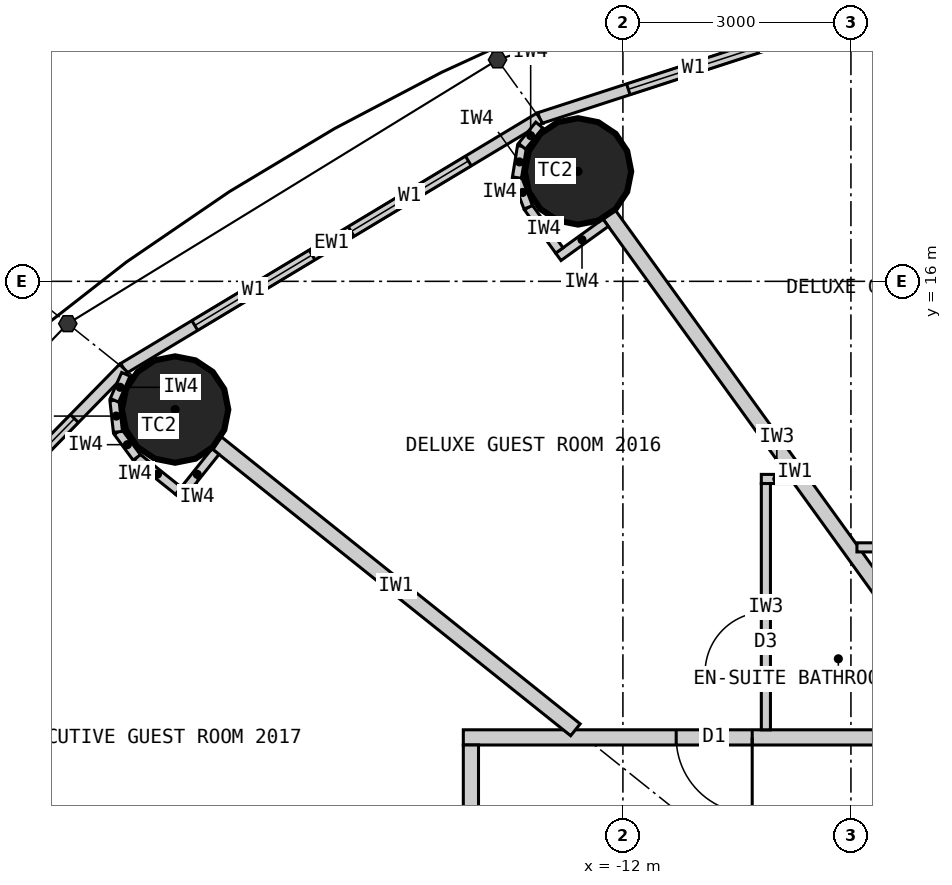
"""IFC4 building model, lengths in metres.
Left out: names, types, materials, properties, quantities, classifications, styles, units other than length and angle.
Written with IfcOpenShell. Run it as: python <this file> out.ifc"""

import sys

from ifc_helpers import new_model, si_unit, direction, frame, frame_2d, origin, origin_2d, place, context, subcontext, project, spatial, rectangle, circle, extrude, element, fill, save


model = new_model("IFC4")
c1 = context("Model", 3, precision=1e-05, world=origin(), true_north=direction((0.0, 1.0)))
c2 = subcontext(c1, "Body", "Model", "MODEL_VIEW")
j1 = project(units=[si_unit("LENGTHUNIT", "METRE"), si_unit("PLANEANGLEUNIT", "RADIAN")], contexts=[c1])
p1 = place(None, origin())
s1 = spatial("IfcSite", under=j1, at=p1, CompositionType="ELEMENT")
p2 = place(p1, origin())
s2 = spatial("IfcBuilding", under=s1, at=p2, CompositionType="ELEMENT")
p3 = place(p2, frame((0.0, 0.0, 80.4)))
s3 = spatial("IfcBuildingStorey", under=s2, at=p3, CompositionType="ELEMENT", Elevation=80.4)
for number, where, z_axis, x_axis in (
    (1, (-12.591, 17.447, 0.0), (0.0, 0.0, 1.0), (1.0, 0.0, 0.0)),
    (2, (-17.892, 14.313, 0.0), (0.0, 0.0, 1.0), (1.0, 0.0, 0.0)),
):
    element("IfcColumn", number, at=place(p3, frame(where, z_axis=z_axis, x_axis=x_axis)), inside=s3, PredefinedType="COLUMN", context=c2, shape_type="SweptSolid", body=[
        extrude(circle(Radius=0.7, at=origin_2d()), origin(), (0.0, 0.0, 1.0), 3.3),
    ])
p4 = place(p3, frame((-6.766, 20.202, 0.0), z_axis=(0.0, 0.0, 1.0), x_axis=(-0.951137534625, -0.308767534285, 0.0)))
e3 = element("IfcWall", 3, at=p4, inside=s3, PredefinedType="ELEMENTEDWALL", context=c2, shape_type="SweptSolid", body=[
    extrude(rectangle(XDim=6.655, YDim=0.15, at=frame_2d((3.328, 0.0))), origin(), (0.0, 0.0, 1.0), 3.12),
])
p5 = place(p4, frame((1.228, 0.0, 0.9)))
e4 = element("IfcOpeningElement", 4, at=p5, cuts=e3, PredefinedType="OPENING", context=c2, shape_type="SweptSolid", body=[
    extrude(rectangle(XDim=1.8, YDim=1.9, at=frame_2d((0.9, 0.95))), frame((0.0, 0.085, 0.0), z_axis=(0.0, -1.0, 0.0), x_axis=(1.0, 0.0, 0.0)), (0.0, 0.0, 1.0), 0.17),
])
p6 = place(p4, frame((3.628, 0.0, 0.9)))
e5 = element("IfcOpeningElement", 5, at=p6, cuts=e3, PredefinedType="OPENING", context=c2, shape_type="SweptSolid", body=[
    extrude(rectangle(XDim=1.8, YDim=1.9, at=frame_2d((0.9, 0.95))), frame((0.0, 0.085, 0.0), z_axis=(0.0, -1.0, 0.0), x_axis=(1.0, 0.0, 0.0)), (0.0, 0.0, 1.0), 0.17),
])
p7 = place(p3, frame((-13.096, 18.147, 0.0), z_axis=(0.0, 0.0, 1.0), x_axis=(-0.856983180864, -0.515344377787, 0.0)))
e6 = element("IfcWall", 6, at=p7, inside=s3, PredefinedType="ELEMENTEDWALL", context=c2, shape_type="SweptSolid", body=[
    extrude(rectangle(XDim=6.386, YDim=0.15, at=frame_2d((3.193, 0.0))), origin(), (0.0, 0.0, 1.0), 3.12),
])
p8 = place(p7, frame((1.093, 0.0, 0.9)))
e7 = element("IfcOpeningElement", 7, at=p8, cuts=e6, PredefinedType="OPENING", context=c2, shape_type="SweptSolid", body=[
    extrude(rectangle(XDim=1.8, YDim=1.9, at=frame_2d((0.9, 0.95))), frame((0.0, 0.085, 0.0), z_axis=(0.0, -1.0, 0.0), x_axis=(1.0, 0.0, 0.0)), (0.0, 0.0, 1.0), 0.17),
])
p9 = place(p7, frame((3.493, 0.0, 0.9)))
e8 = element("IfcOpeningElement", 8, at=p9, cuts=e6, PredefinedType="OPENING", context=c2, shape_type="SweptSolid", body=[
    extrude(rectangle(XDim=1.8, YDim=1.9, at=frame_2d((0.9, 0.95))), frame((0.0, 0.085, 0.0), z_axis=(0.0, -1.0, 0.0), x_axis=(1.0, 0.0, 0.0)), (0.0, 0.0, 1.0), 0.17),
])
p10 = place(p3, frame((-18.57, 14.856, 0.0), z_axis=(0.0, 0.0, 1.0), x_axis=(-0.699602905915, -0.714531856557, 0.0)))
e9 = element("IfcWall", 9, at=p10, inside=s3, PredefinedType="ELEMENTEDWALL", context=c2, shape_type="SweptSolid", body=[
    extrude(rectangle(XDim=6.051, YDim=0.15, at=frame_2d((3.025, 0.0))), origin(), (0.0, 0.0, 1.0), 3.12),
])
p11 = place(p10, frame((0.926, 0.0, 0.9)))
e10 = element("IfcOpeningElement", 10, at=p11, cuts=e9, PredefinedType="OPENING", context=c2, shape_type="SweptSolid", body=[
    extrude(rectangle(XDim=1.8, YDim=1.9, at=frame_2d((0.9, 0.95))), frame((0.0, 0.085, 0.0), z_axis=(0.0, -1.0, 0.0), x_axis=(1.0, 0.0, 0.0)), (0.0, 0.0, 1.0), 0.17),
])
p12 = place(p10, frame((3.325, 0.0, 0.9)))
e11 = element("IfcOpeningElement", 11, at=p12, cuts=e9, PredefinedType="OPENING", context=c2, shape_type="SweptSolid", body=[
    extrude(rectangle(XDim=1.8, YDim=1.9, at=frame_2d((0.9, 0.95))), frame((0.0, 0.085, 0.0), z_axis=(0.0, -1.0, 0.0), x_axis=(1.0, 0.0, 0.0)), (0.0, 0.0, 1.0), 0.17),
])
p13 = place(p3, frame((-14.1, 10.0, 0.0), z_axis=(0.0, 0.0, 1.0), x_axis=(1.0, 0.0, 0.0)))
e12 = element("IfcWall", 12, at=p13, inside=s3, PredefinedType="PARTITIONING", context=c2, shape_type="SweptSolid", body=[
    extrude(rectangle(XDim=28.2, YDim=0.2, at=frame_2d((14.1, 0.0))), origin(), (0.0, 0.0, 1.0), 3.12),
])
p14 = place(p13, frame((23.865, 0.0, 0.0)))
e13 = element("IfcOpeningElement", 13, at=p14, cuts=e12, PredefinedType="OPENING", context=c2, shape_type="SweptSolid", body=[
    extrude(rectangle(XDim=1.0, YDim=2.2, at=frame_2d((0.5, 1.1))), frame((0.0, 0.11, 0.0), z_axis=(0.0, -1.0, 0.0), x_axis=(1.0, 0.0, 0.0)), (0.0, 0.0, 1.0), 0.22),
])
p15 = place(p13, frame((18.529, 0.0, 0.0)))
e14 = element("IfcOpeningElement", 14, at=p15, cuts=e12, PredefinedType="OPENING", context=c2, shape_type="SweptSolid", body=[
    extrude(rectangle(XDim=1.0, YDim=2.2, at=frame_2d((0.5, 1.1))), frame((0.0, 0.11, 0.0), z_axis=(0.0, -1.0, 0.0), x_axis=(1.0, 0.0, 0.0)), (0.0, 0.0, 1.0), 0.22),
])
p16 = place(p13, frame((14.623, 0.0, 0.0)))
e15 = element("IfcOpeningElement", 15, at=p16, cuts=e12, PredefinedType="OPENING", context=c2, shape_type="SweptSolid", body=[
    extrude(rectangle(XDim=1.0, YDim=2.2, at=frame_2d((0.5, 1.1))), frame((0.0, 0.11, 0.0), z_axis=(0.0, -1.0, 0.0), x_axis=(1.0, 0.0, 0.0)), (0.0, 0.0, 1.0), 0.22),
])
p17 = place(p13, frame((11.24, 0.0, 0.0)))
e16 = element("IfcOpeningElement", 16, at=p17, cuts=e12, PredefinedType="OPENING", context=c2, shape_type="SweptSolid", body=[
    extrude(rectangle(XDim=1.0, YDim=2.2, at=frame_2d((0.5, 1.1))), frame((0.0, 0.11, 0.0), z_axis=(0.0, -1.0, 0.0), x_axis=(1.0, 0.0, 0.0)), (0.0, 0.0, 1.0), 0.22),
])
p18 = place(p13, frame((8.671, 0.0, 0.0)))
e17 = element("IfcOpeningElement", 17, at=p18, cuts=e12, PredefinedType="OPENING", context=c2, shape_type="SweptSolid", body=[
    extrude(rectangle(XDim=1.0, YDim=2.2, at=frame_2d((0.5, 1.1))), frame((0.0, 0.11, 0.0), z_axis=(0.0, -1.0, 0.0), x_axis=(1.0, 0.0, 0.0)), (0.0, 0.0, 1.0), 0.22),
])
p19 = place(p13, frame((2.801, 0.0, 0.0)))
e18 = element("IfcOpeningElement", 18, at=p19, cuts=e12, PredefinedType="OPENING", context=c2, shape_type="SweptSolid", body=[
    extrude(rectangle(XDim=1.0, YDim=2.2, at=frame_2d((0.5, 1.1))), frame((0.0, 0.11, 0.0), z_axis=(0.0, -1.0, 0.0), x_axis=(1.0, 0.0, 0.0)), (0.0, 0.0, 1.0), 0.22),
])
p20 = place(p3, frame((-14.0, 9.9, 0.0), z_axis=(0.0, 0.0, 1.0), x_axis=(0.0, -1.0, 0.0)))
e19 = element("IfcWall", 19, at=p20, inside=s3, PredefinedType="PARTITIONING", context=c2, shape_type="SweptSolid", body=[
    extrude(rectangle(XDim=19.8, YDim=0.2, at=frame_2d((9.9, 0.0))), origin(), (0.0, 0.0, 1.0), 3.12),
])
p21 = place(p20, frame((7.097, 0.0, 0.0)))
e20 = element("IfcOpeningElement", 20, at=p21, cuts=e19, PredefinedType="OPENING", context=c2, shape_type="SweptSolid", body=[
    extrude(rectangle(XDim=1.0, YDim=2.2, at=frame_2d((0.5, 1.1))), frame((0.0, 0.11, 0.0), z_axis=(0.0, -1.0, 0.0), x_axis=(1.0, 0.0, 0.0)), (0.0, 0.0, 1.0), 0.22),
])
p22 = place(p20, frame((10.778, 0.0, 0.0)))
e21 = element("IfcOpeningElement", 21, at=p22, cuts=e19, PredefinedType="OPENING", context=c2, shape_type="SweptSolid", body=[
    extrude(rectangle(XDim=1.0, YDim=2.2, at=frame_2d((0.5, 1.1))), frame((0.0, 0.11, 0.0), z_axis=(0.0, -1.0, 0.0), x_axis=(1.0, 0.0, 0.0)), (0.0, 0.0, 1.0), 0.22),
])
p23 = place(p20, frame((13.552, 0.0, 0.0)))
e22 = element("IfcOpeningElement", 22, at=p23, cuts=e19, PredefinedType="OPENING", context=c2, shape_type="SweptSolid", body=[
    extrude(rectangle(XDim=1.0, YDim=2.2, at=frame_2d((0.5, 1.1))), frame((0.0, 0.11, 0.0), z_axis=(0.0, -1.0, 0.0), x_axis=(1.0, 0.0, 0.0)), (0.0, 0.0, 1.0), 0.22),
])
p24 = place(p20, frame((18.698, 0.0, 0.0)))
e23 = element("IfcOpeningElement", 23, at=p24, cuts=e19, PredefinedType="OPENING", context=c2, shape_type="SweptSolid", body=[
    extrude(rectangle(XDim=1.0, YDim=2.2, at=frame_2d((0.5, 1.1))), frame((0.0, 0.11, 0.0), z_axis=(0.0, -1.0, 0.0), x_axis=(1.0, 0.0, 0.0)), (0.0, 0.0, 1.0), 0.22),
])
p25 = place(p20, frame((1.877, 0.0, 0.0)))
e24 = element("IfcOpeningElement", 24, at=p25, cuts=e19, PredefinedType="OPENING", context=c2, shape_type="SweptSolid", body=[
    extrude(rectangle(XDim=1.0, YDim=2.2, at=frame_2d((0.5, 1.1))), frame((0.0, 0.11, 0.0), z_axis=(0.0, -1.0, 0.0), x_axis=(1.0, 0.0, 0.0)), (0.0, 0.0, 1.0), 0.22),
])
p26 = place(p3, frame((-7.289, 10.1, 0.0), z_axis=(0.0, 0.0, 1.0), x_axis=(-0.585198353053, 0.810890182197, 0.0)))
e25 = element("IfcWall", 25, at=p26, inside=s3, PredefinedType="PARTITIONING", context=c2, shape_type="SweptSolid", body=[
    extrude(rectangle(XDim=8.36, YDim=0.2, at=frame_2d((4.18, 0.0))), origin(), (0.0, 0.0, 1.0), 2.32),
])
p27 = place(p3, frame((-12.625, 10.1, 0.0), z_axis=(0.0, 0.0, 1.0), x_axis=(-0.780892451574, 0.624665493744, 0.0)))
e26 = element("IfcWall", 26, at=p27, inside=s3, PredefinedType="PARTITIONING", context=c2, shape_type="SweptSolid", body=[
    extrude(rectangle(XDim=6.045, YDim=0.2, at=frame_2d((3.022, 0.0))), origin(), (0.0, 0.0, 1.0), 2.32),
])
p28 = place(p3, frame((-8.921, 12.5, 0.0), z_axis=(0.0, 0.0, 1.0), x_axis=(1.0, 0.0, 0.0)))
e27 = element("IfcWall", 27, at=p28, inside=s3, PredefinedType="PARTITIONING", context=c2, shape_type="SweptSolid", body=[
    extrude(rectangle(XDim=3.372, YDim=0.12, at=frame_2d((1.686, 0.0))), origin(), (0.0, 0.0, 1.0), 3.12),
])
p29 = place(p3, frame((-9.771, 13.4, 0.0), z_axis=(0.0, 0.0, 1.0), x_axis=(-1.0, 0.0, 0.0)))
e28 = element("IfcWall", 28, at=p29, inside=s3, PredefinedType="PARTITIONING", context=c2, shape_type="SweptSolid", body=[
    extrude(rectangle(XDim=0.408, YDim=0.12, at=frame_2d((0.204, 0.0))), origin(), (0.0, 0.0, 1.0), 3.12),
])
p30 = place(p3, frame((-10.119, 10.1, 0.0), z_axis=(0.0, 0.0, 1.0), x_axis=(0.0, 1.0, 0.0)))
e29 = element("IfcWall", 29, at=p30, inside=s3, PredefinedType="PARTITIONING", context=c2, shape_type="SweptSolid", body=[
    extrude(rectangle(XDim=3.24, YDim=0.12, at=frame_2d((1.62, 0.0))), origin(), (0.0, 0.0, 1.0), 3.12),
])
p31 = place(p30, frame((0.75, 0.0, 0.0)))
e30 = element("IfcOpeningElement", 30, at=p31, cuts=e29, PredefinedType="OPENING", context=c2, shape_type="SweptSolid", body=[
    extrude(rectangle(XDim=0.8, YDim=2.1, at=frame_2d((0.4, 1.05))), frame((0.0, 0.07, 0.0), z_axis=(0.0, -1.0, 0.0), x_axis=(1.0, 0.0, 0.0)), (0.0, 0.0, 1.0), 0.14),
])
p32 = place(p3, frame((-12.227, 16.772, 0.0), z_axis=(0.0, 0.0, 1.0), x_axis=(-0.810821798253, -0.585293098778, 0.0)))
e31 = element("IfcWall", 31, at=p32, inside=s3, PredefinedType="PARTITIONING", context=c2, shape_type="SweptSolid", body=[
    extrude(rectangle(XDim=0.768, YDim=0.12, at=frame_2d((0.384, 0.0))), origin(), (0.0, 0.0, 1.0), 3.12),
])
p33 = place(p3, frame((-12.836, 16.406, 0.0), z_axis=(0.0, 0.0, 1.0), x_axis=(-0.585223113993, 0.810872312296, 0.0)))
e32 = element("IfcWall", 32, at=p33, inside=s3, PredefinedType="PARTITIONING", context=c2, shape_type="SweptSolid", body=[
    extrude(rectangle(XDim=0.7, YDim=0.12, at=frame_2d((0.35, 0.0))), origin(), (0.0, 0.0, 1.0), 3.12),
])
p34 = place(p3, frame((-13.246, 16.974, 0.0), z_axis=(0.0, 0.0, 1.0), x_axis=(-0.355728122235, 0.934589483705, 0.0)))
e33 = element("IfcWall", 33, at=p34, inside=s3, PredefinedType="PARTITIONING", context=c2, shape_type="SweptSolid", body=[
    extrude(rectangle(XDim=0.418, YDim=0.12, at=frame_2d((0.209, 0.0))), origin(), (0.0, 0.0, 1.0), 3.12),
])
p35 = place(p3, frame((-13.394, 17.365, 0.0), z_axis=(0.0, 0.0, 1.0), x_axis=(0.159379276926, 0.987217425943, 0.0)))
e34 = element("IfcWall", 34, at=p35, inside=s3, PredefinedType="PARTITIONING", context=c2, shape_type="SweptSolid", body=[
    extrude(rectangle(XDim=0.418, YDim=0.12, at=frame_2d((0.209, 0.0))), origin(), (0.0, 0.0, 1.0), 3.12),
])
p36 = place(p3, frame((-13.328, 17.777, 0.0), z_axis=(0.0, 0.0, 1.0), x_axis=(0.632276783541, 0.774742582407, 0.0)))
e35 = element("IfcWall", 35, at=p36, inside=s3, PredefinedType="PARTITIONING", context=c2, shape_type="SweptSolid", body=[
    extrude(rectangle(XDim=0.36, YDim=0.12, at=frame_2d((0.18, 0.0))), origin(), (0.0, 0.0, 1.0), 3.12),
])
p37 = place(p3, frame((-17.361, 13.76, 0.0), z_axis=(0.0, 0.0, 1.0), x_axis=(-0.624501042889, -0.781023973659, 0.0)))
e36 = element("IfcWall", 36, at=p37, inside=s3, PredefinedType="PARTITIONING", context=c2, shape_type="SweptSolid", body=[
    extrude(rectangle(XDim=0.767, YDim=0.12, at=frame_2d((0.384, 0.0))), origin(), (0.0, 0.0, 1.0), 3.12),
])
p38 = place(p3, frame((-17.85, 13.246, 0.0), z_axis=(0.0, 0.0, 1.0), x_axis=(-0.780902834923, 0.62465251333, 0.0)))
e37 = element("IfcWall", 37, at=p38, inside=s3, PredefinedType="PARTITIONING", context=c2, shape_type="SweptSolid", body=[
    extrude(rectangle(XDim=0.7, YDim=0.12, at=frame_2d((0.35, 0.0))), origin(), (0.0, 0.0, 1.0), 3.12),
])
for number, where, z_axis, x_axis in (
    (38, (-18.396, 13.683, 0.0), (0.0, 0.0, 1.0), (-0.592, 0.806, 0.0)),
    (39, (-18.644, 14.02, 0.0), (0.0, 0.0, 1.0), (-0.11, 0.994, 0.0)),
):
    element("IfcWall", number, at=place(p3, frame(where, z_axis=z_axis, x_axis=x_axis)), inside=s3, PredefinedType="PARTITIONING", context=c2, shape_type="SweptSolid", body=[
        extrude(rectangle(XDim=0.418, YDim=0.12, at=frame_2d((0.209, 0.0))), origin(), (0.0, 0.0, 1.0), 3.12),
    ])
p39 = place(p3, frame((-18.69, 14.435, 0.0), z_axis=(0.0, 0.0, 1.0), x_axis=(0.401093412634, 0.91603715773, 0.0)))
e40 = element("IfcWall", 40, at=p39, inside=s3, PredefinedType="PARTITIONING", context=c2, shape_type="SweptSolid", body=[
    extrude(rectangle(XDim=0.373, YDim=0.12, at=frame_2d((0.187, 0.0))), origin(), (0.0, 0.0, 1.0), 3.12),
])
p40 = place(p6, origin())
e41 = element("IfcWindow", 41, at=p40, inside=s3, PartitioningType="SINGLE_PANEL", PredefinedType="WINDOW", context=c2, shape_type="SweptSolid", body=[
    extrude(rectangle(XDim=1.8, YDim=1.9, at=frame_2d((0.9, 0.95))), frame((0.0, 0.03, 0.0), z_axis=(0.0, -1.0, 0.0), x_axis=(1.0, 0.0, 0.0)), (0.0, 0.0, 1.0), 0.06),
])
fill(e5, e41)
p41 = place(p8, origin())
e42 = element("IfcWindow", 42, at=p41, inside=s3, PartitioningType="SINGLE_PANEL", PredefinedType="WINDOW", context=c2, shape_type="SweptSolid", body=[
    extrude(rectangle(XDim=1.8, YDim=1.9, at=frame_2d((0.9, 0.95))), frame((0.0, 0.03, 0.0), z_axis=(0.0, -1.0, 0.0), x_axis=(1.0, 0.0, 0.0)), (0.0, 0.0, 1.0), 0.06),
])
fill(e7, e42)
p42 = place(p9, origin())
e43 = element("IfcWindow", 43, at=p42, inside=s3, PartitioningType="SINGLE_PANEL", PredefinedType="WINDOW", context=c2, shape_type="SweptSolid", body=[
    extrude(rectangle(XDim=1.8, YDim=1.9, at=frame_2d((0.9, 0.95))), frame((0.0, 0.03, 0.0), z_axis=(0.0, -1.0, 0.0), x_axis=(1.0, 0.0, 0.0)), (0.0, 0.0, 1.0), 0.06),
])
fill(e8, e43)
p43 = place(p11, origin())
e44 = element("IfcWindow", 44, at=p43, inside=s3, PartitioningType="SINGLE_PANEL", PredefinedType="WINDOW", context=c2, shape_type="SweptSolid", body=[
    extrude(rectangle(XDim=1.8, YDim=1.9, at=frame_2d((0.9, 0.95))), frame((0.0, 0.03, 0.0), z_axis=(0.0, -1.0, 0.0), x_axis=(1.0, 0.0, 0.0)), (0.0, 0.0, 1.0), 0.06),
])
fill(e10, e44)
p44 = place(p31, origin())
e45 = element("IfcDoor", 45, at=p44, inside=s3, OperationType="SINGLE_SWING_LEFT", PredefinedType="DOOR", context=c2, shape_type="SweptSolid", body=[
    extrude(rectangle(XDim=0.8, YDim=2.1, at=frame_2d((0.4, 1.05))), frame((0.0, 0.025, 0.0), z_axis=(0.0, -1.0, 0.0), x_axis=(1.0, 0.0, 0.0)), (0.0, 0.0, 1.0), 0.05),
])
fill(e30, e45)
p45 = place(p19, origin())
e46 = element("IfcDoor", 46, at=p45, inside=s3, OperationType="SINGLE_SWING_RIGHT", PredefinedType="DOOR", context=c2, shape_type="SweptSolid", body=[
    extrude(rectangle(XDim=1.0, YDim=2.2, at=frame_2d((0.5, 1.1))), frame((0.0, 0.025, 0.0), z_axis=(0.0, -1.0, 0.0), x_axis=(1.0, 0.0, 0.0)), (0.0, 0.0, 1.0), 0.05),
])
fill(e18, e46)
save(model, sys.argv[1])
